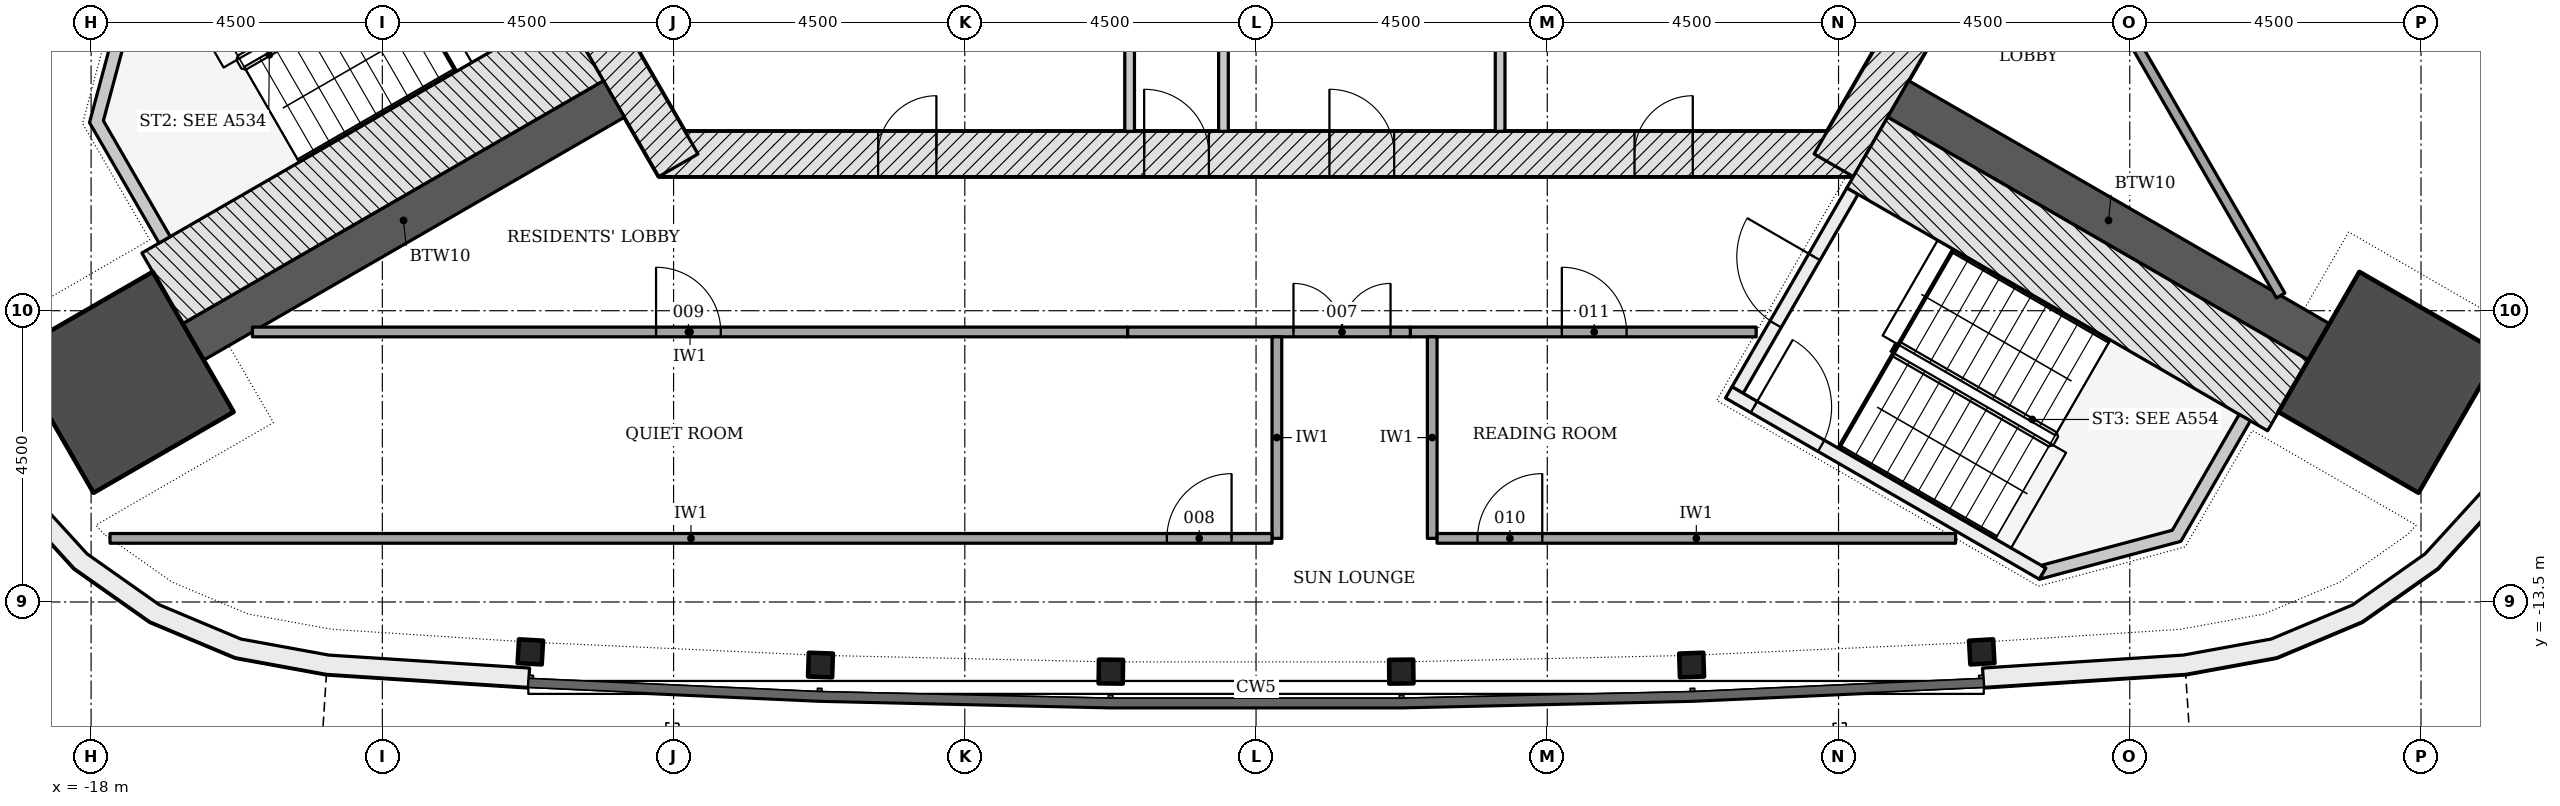
"""IFC4 building model, lengths in metres.
Left out: names, types, materials, properties, quantities, classifications, styles, units other than length and angle.
Written with IfcOpenShell. Run it as: python <this file> out.ifc"""

import sys

from ifc_helpers import new_model, si_unit, direction, frame, frame_2d, origin, origin_2d, place, context, subcontext, project, spatial, polyline, rectangle, i_section, outline, extrude, element, fill, save


model = new_model("IFC4")
c1 = context("Model", 3, precision=1e-05, world=origin(), true_north=direction((0.0, 1.0)))
c2 = subcontext(c1, "Body", "Model", "MODEL_VIEW")
j1 = project(units=[si_unit("LENGTHUNIT", "METRE"), si_unit("PLANEANGLEUNIT", "RADIAN")], contexts=[c1])
p1 = place(None, origin())
s1 = spatial("IfcSite", under=j1, at=p1, CompositionType="ELEMENT")
p2 = place(p1, origin())
s2 = spatial("IfcBuilding", under=s1, at=p2, CompositionType="ELEMENT")
p3 = place(p2, frame((0.0, 0.0, 232.8)))
s3 = spatial("IfcBuildingStorey", under=s2, at=p3, CompositionType="ELEMENT", Elevation=232.8)
p4 = place(p3, frame((-9.229, -6.578, -0.2), z_axis=(0.0, 0.0, 1.0), x_axis=(1.0, 0.0, 0.0)))
e1 = element("IfcWall", 1, at=p4, inside=s3, PredefinedType="SHEAR", context=c2, shape_type="SweptSolid", body=[
    extrude(rectangle(XDim=18.458, YDim=0.7, at=frame_2d((9.229, 0.0))), origin(), (0.0, 0.0, 1.0), 3.6),
])
p5 = place(p4, frame((7.5, 0.0, 0.2)))
e2 = element("IfcOpeningElement", 2, at=p5, cuts=e1, PredefinedType="OPENING", context=c2, shape_type="SweptSolid", body=[
    extrude(rectangle(XDim=1.0, YDim=2.1, at=frame_2d((0.5, 1.05))), frame((0.0, 0.36, 0.0), z_axis=(0.0, -1.0, 0.0), x_axis=(1.0, 0.0, 0.0)), (0.0, 0.0, 1.0), 0.72),
])
p6 = place(p4, frame((3.389, 0.0, 0.2)))
e3 = element("IfcOpeningElement", 3, at=p6, cuts=e1, PredefinedType="OPENING", context=c2, shape_type="SweptSolid", body=[
    extrude(rectangle(XDim=0.9, YDim=2.1, at=frame_2d((0.45, 1.05))), frame((0.0, 0.36, 0.0), z_axis=(0.0, -1.0, 0.0), x_axis=(1.0, 0.0, 0.0)), (0.0, 0.0, 1.0), 0.72),
])
p7 = place(p4, frame((10.363, 0.0, 0.2)))
e4 = element("IfcOpeningElement", 4, at=p7, cuts=e1, PredefinedType="OPENING", context=c2, shape_type="SweptSolid", body=[
    extrude(rectangle(XDim=1.0, YDim=2.1, at=frame_2d((0.5, 1.05))), frame((0.0, 0.36, 0.0), z_axis=(0.0, -1.0, 0.0), x_axis=(1.0, 0.0, 0.0)), (0.0, 0.0, 1.0), 0.72),
])
p8 = place(p4, frame((15.077, 0.0, 0.2)))
e5 = element("IfcOpeningElement", 5, at=p8, cuts=e1, PredefinedType="OPENING", context=c2, shape_type="SweptSolid", body=[
    extrude(rectangle(XDim=0.9, YDim=2.1, at=frame_2d((0.45, 1.05))), frame((0.0, 0.36, 0.0), z_axis=(0.0, -1.0, 0.0), x_axis=(1.0, 0.0, 0.0)), (0.0, 0.0, 1.0), 0.72),
])
for number, where, z_axis, x_axis in (
    (6, (8.926, -6.753, -0.2), (0.0, 0.0, 1.0), (0.5, 0.866, 0.0)),
    (7, (-10.311, -4.353, -0.2), (0.0, 0.0, 1.0), (0.5, -0.866, 0.0)),
):
    element("IfcWall", number, at=place(p3, frame(where, z_axis=z_axis, x_axis=x_axis)), inside=s3, PredefinedType="SHEAR", context=c2, shape_type="SweptSolid", body=[
        extrude(rectangle(XDim=2.771, YDim=0.7, at=frame_2d((1.386, 0.0))), origin(), (0.0, 0.0, 1.0), 3.6),
    ])
for number, where, z_axis, x_axis in (
    (8, (-9.922, -5.728, -0.2), (0.0, 0.0, 1.0), (-0.866, -0.5, 0.0)),
    (9, (9.922, -5.728, -0.2), (0.0, 0.0, 1.0), (0.866, -0.5, 0.0)),
):
    element("IfcWall", number, at=place(p3, frame(where, z_axis=z_axis, x_axis=x_axis)), inside=s3, PredefinedType="SHEAR", context=c2, shape_type="SweptSolid", body=[
        extrude(rectangle(XDim=7.506, YDim=0.65, at=frame_2d((3.753, 0.0))), origin(), (0.0, 0.0, 1.0), 3.6),
    ])
for number, where, z_axis, x_axis in (
    (10, (-17.505, -10.106, -0.2), (0.0, 0.0, 1.0), (-0.866, -0.5, 0.0)),
    (11, (17.505, -10.106, -0.2), (0.0, 0.0, 1.0), (0.866, -0.5, 0.0)),
):
    element("IfcColumn", number, at=place(p3, frame(where, z_axis=z_axis, x_axis=x_axis)), inside=s3, PredefinedType="COLUMN", context=c2, shape_type="SweptSolid", body=[
        extrude(rectangle(XDim=2.5, YDim=2.5, at=origin_2d()), origin(), (0.0, 0.0, 1.0), 3.6),
    ])
for number, where, z_axis, x_axis in (
    (12, (-11.213, -14.271, -0.2), (0.0, 0.0, 1.0), (0.998, -0.057, 0.0)),
    (13, (-6.73, -14.474, -0.2), (0.0, 0.0, 1.0), (0.999, -0.034, 0.0)),
    (14, (-2.244, -14.576, -0.2), (0.0, 0.0, 1.0), (1.0, -0.011, 0.0)),
    (15, (2.244, -14.576, -0.2), (0.0, 0.0, 1.0), (1.0, 0.011, 0.0)),
    (16, (6.73, -14.474, -0.2), (0.0, 0.0, 1.0), (0.999, 0.034, 0.0)),
    (17, (11.213, -14.271, -0.2), (0.0, 0.0, 1.0), (0.998, 0.057, 0.0)),
):
    element("IfcColumn", number, at=place(p3, frame(where, z_axis=z_axis, x_axis=x_axis)), inside=s3, PredefinedType="COLUMN", context=c2, shape_type="SweptSolid", body=[
        extrude(i_section(OverallWidth=0.373, OverallDepth=0.368, WebThickness=0.015, FlangeThickness=0.024, FilletRadius=0.015, at=origin_2d()), origin(), (0.0, 0.0, 1.0), 3.6),
    ])
p9 = place(p3, origin())
e18 = element("IfcWall", 18, at=p9, inside=s3, PredefinedType="NOTDEFINED", context=c2, shape_type="SweptSolid", body=[
    extrude(outline(polyline([(-18.457, -2.328), (-19.842, -5.13), (-20.323, -6.478), (-20.504, -7.898), (-20.375, -9.323), (-19.942, -10.687), (-19.227, -11.927), (-18.261, -12.983), (-17.092, -13.808), (-15.772, -14.361), (-14.364, -14.619), (-11.244, -14.82), (-11.225, -14.521), (-14.327, -14.32), (-15.686, -14.072), (-16.945, -13.544), (-18.062, -12.757), (-18.983, -11.748), (-19.666, -10.566), (-20.079, -9.264), (-20.202, -7.903), (-20.03, -6.548), (-19.565, -5.248), (-18.188, -2.46), (-18.457, -2.328)])), origin(), (0.0, 0.0, 1.0), 3.3),
])
p10 = place(p3, origin())
e19 = element("IfcWall", 19, at=p10, inside=s3, PredefinedType="NOTDEFINED", context=c2, shape_type="SweptSolid", body=[
    extrude(outline(polyline([(11.244, -14.82), (14.364, -14.619), (15.772, -14.361), (17.092, -13.808), (18.261, -12.983), (19.227, -11.927), (19.942, -10.687), (20.375, -9.323), (20.504, -7.898), (20.323, -6.478), (19.842, -5.13), (18.457, -2.328), (18.188, -2.46), (19.565, -5.248), (20.03, -6.548), (20.202, -7.903), (20.079, -9.264), (19.666, -10.566), (18.983, -11.748), (18.062, -12.757), (16.945, -13.544), (15.686, -14.072), (14.327, -14.32), (11.225, -14.521), (11.244, -14.82)])), origin(), (0.0, 0.0, 1.0), 3.3),
])
p11 = place(p3, frame((-1.954, 8.942, 0.0), z_axis=(0.0, 0.0, 1.0), x_axis=(0.0, -1.0, 0.0)))
e20 = element("IfcWall", 20, at=p11, inside=s3, PredefinedType="PARTITIONING", context=c2, shape_type="SweptSolid", body=[
    extrude(rectangle(XDim=15.171, YDim=0.15, at=frame_2d((7.585, 0.0))), origin(), (0.0, 0.0, 1.0), 3.4),
])
p12 = place(p11, frame((7.121, 0.0, 0.0)))
e21 = element("IfcOpeningElement", 21, at=p12, cuts=e20, PredefinedType="OPENING", context=c2, shape_type="SweptSolid", body=[
    extrude(rectangle(XDim=0.9, YDim=2.1, at=frame_2d((0.45, 1.05))), frame((0.0, 0.085, 0.0), z_axis=(0.0, -1.0, 0.0), x_axis=(1.0, 0.0, 0.0)), (0.0, 0.0, 1.0), 0.17),
])
p13 = place(p3, frame((-0.504, 5.897, 0.0), z_axis=(0.0, 0.0, 1.0), x_axis=(0.0, -1.0, 0.0)))
e22 = element("IfcWall", 22, at=p13, inside=s3, PredefinedType="PARTITIONING", context=c2, shape_type="SweptSolid", body=[
    extrude(rectangle(XDim=12.125, YDim=0.15, at=frame_2d((6.062, 0.0))), origin(), (0.0, 0.0, 1.0), 3.4),
])
p14 = place(p13, frame((4.114, 0.0, 0.0)))
e23 = element("IfcOpeningElement", 23, at=p14, cuts=e22, PredefinedType="OPENING", context=c2, shape_type="SweptSolid", body=[
    extrude(rectangle(XDim=0.9, YDim=2.1, at=frame_2d((0.45, 1.05))), frame((0.0, 0.085, 0.0), z_axis=(0.0, -1.0, 0.0), x_axis=(1.0, 0.0, 0.0)), (0.0, 0.0, 1.0), 0.17),
])
p15 = place(p3, frame((3.771, -3.303, 0.0), z_axis=(0.0, 0.0, 1.0), x_axis=(0.0, -1.0, 0.0)))
e24 = element("IfcWall", 24, at=p15, inside=s3, PredefinedType="PARTITIONING", context=c2, shape_type="SweptSolid", body=[
    extrude(rectangle(XDim=2.925, YDim=0.15, at=frame_2d((1.462, 0.0))), origin(), (0.0, 0.0, 1.0), 3.4),
])
p16 = place(p3, frame((-10.399, -4.901, -0.2), z_axis=(0.0, 0.0, 1.0), x_axis=(-0.866020939036, -0.500007733091, 0.0)))
e25 = element("IfcWall", 25, at=p16, inside=s3, PredefinedType="SHEAR", context=c2, shape_type="SweptSolid", body=[
    extrude(rectangle(XDim=7.507, YDim=1.261, at=frame_2d((3.753, 0.0))), origin(), (0.0, 0.0, 1.0), 3.6),
])
p17 = place(p3, frame((0.0, 0.0, -0.2)))
e26 = element("IfcWall", 26, at=p17, inside=s3, PredefinedType="SHEAR", context=c2, shape_type="SweptSolid", body=[
    extrude(outline(polyline([(-17.439, -3.907), (-18.025, -6.093), (-16.95, -7.955), (-16.777, -7.855), (-17.81, -6.065), (-17.267, -4.039), (-17.339, -4.081), (-17.339, -4.081), (-17.339, -4.081), (-17.339, -4.081), (-17.339, -4.081), (-17.339, -4.081), (-17.339, -4.081), (-17.339, -4.081), (-17.339, -4.081), (-17.339, -4.081), (-17.339, -4.081), (-17.339, -4.081), (-17.339, -4.081), (-17.339, -4.081), (-17.339, -4.081), (-17.339, -4.081), (-17.339, -4.081), (-17.439, -3.907)])), origin(), (0.0, 0.0, 1.0), 3.6),
])
p18 = place(p3, frame((7.44, -10.226, -0.2), z_axis=(0.0, 0.0, 1.0), x_axis=(0.500022077904, 0.866012656725, 0.0)))
e27 = element("IfcWall", 27, at=p18, inside=s3, PredefinedType="SHEAR", context=c2, shape_type="SweptSolid", body=[
    extrude(rectangle(XDim=3.55, YDim=0.2, at=frame_2d((1.775, 0.0))), origin(), (0.0, 0.0, 1.0), 3.6),
])
p19 = place(p18, frame((1.175, 0.0, 0.2)))
e28 = element("IfcOpeningElement", 28, at=p19, cuts=e27, PredefinedType="OPENING", context=c2, shape_type="SweptSolid", body=[
    extrude(rectangle(XDim=1.2, YDim=2.1, at=frame_2d((0.6, 1.05))), frame((0.0, 0.11, 0.0), z_axis=(0.0, -1.0, 0.0), x_axis=(1.0, 0.0, 0.0)), (0.0, 0.0, 1.0), 0.22),
])
p20 = place(p3, frame((7.304, -10.262, -0.2), z_axis=(0.0, 0.0, 1.0), x_axis=(0.866026594901, -0.49999793692, 0.0)))
e29 = element("IfcWall", 29, at=p20, inside=s3, PredefinedType="SHEAR", context=c2, shape_type="SweptSolid", body=[
    extrude(rectangle(XDim=5.6, YDim=0.2, at=frame_2d((2.8, 0.0))), origin(), (0.0, 0.0, 1.0), 3.6),
])
p21 = place(p20, frame((0.45, 0.0, 0.2)))
e30 = element("IfcOpeningElement", 30, at=p21, cuts=e29, PredefinedType="OPENING", context=c2, shape_type="SweptSolid", body=[
    extrude(rectangle(XDim=1.2, YDim=2.1, at=frame_2d((0.6, 1.05))), frame((0.0, 0.11, 0.0), z_axis=(0.0, -1.0, 0.0), x_axis=(1.0, 0.0, 0.0)), (0.0, 0.0, 1.0), 0.22),
])
p22 = place(p3, frame((9.444, -6.555, -0.2), z_axis=(0.0, 0.0, 1.0), x_axis=(0.866020939036, -0.500007733091, 0.0)))
e31 = element("IfcWall", 31, at=p22, inside=s3, PredefinedType="SHEAR", context=c2, shape_type="SweptSolid", body=[
    extrude(rectangle(XDim=7.507, YDim=1.261, at=frame_2d((3.753, 0.0))), origin(), (0.0, 0.0, 1.0), 3.6),
])
p23 = place(p3, frame((0.0, 0.0, -0.2)))
e32 = element("IfcWall", 32, at=p23, inside=s3, PredefinedType="SHEAR", context=c2, shape_type="SweptSolid", body=[
    extrude(outline(polyline([(12.104, -13.149), (14.289, -12.563), (15.364, -10.701), (15.191, -10.601), (14.157, -12.392), (12.132, -12.934), (12.204, -12.976), (12.204, -12.976), (12.204, -12.976), (12.204, -12.976), (12.204, -12.976), (12.204, -12.976), (12.204, -12.976), (12.204, -12.976), (12.204, -12.976), (12.204, -12.976), (12.204, -12.976), (12.204, -12.976), (12.204, -12.976), (12.204, -12.976), (12.204, -12.976), (12.204, -12.976), (12.204, -12.976), (12.104, -13.149)])), origin(), (0.0, 0.0, 1.0), 3.6),
])
p24 = place(p3, frame((15.832, -8.765, 0.0), z_axis=(0.0, 0.0, 1.0), x_axis=(-0.500008967739, 0.866020226196, 0.0)))
e33 = element("IfcWall", 33, at=p24, inside=s3, PredefinedType="PARTITIONING", context=c2, shape_type="SweptSolid", body=[
    extrude(rectangle(XDim=13.523, YDim=0.15, at=frame_2d((6.761, 0.0))), origin(), (0.0, 0.0, 1.0), 2.852),
])
p25 = place(p3, frame((-15.507, -9.328, 0.0), z_axis=(0.0, 0.0, 1.0), x_axis=(1.0, 0.0, 0.0)))
e34 = element("IfcWall", 34, at=p25, inside=s3, PredefinedType="PARTITIONING", context=c2, shape_type="SweptSolid", body=[
    extrude(rectangle(XDim=13.522, YDim=0.15, at=frame_2d((6.761, 0.0))), origin(), (0.0, 0.0, 1.0), 2.852),
])
p26 = place(p25, frame((6.236, 0.0, 0.0)))
e35 = element("IfcOpeningElement", 35, at=p26, cuts=e34, PredefinedType="OPENING", context=c2, shape_type="SweptSolid", body=[
    extrude(rectangle(XDim=1.0, YDim=2.1, at=frame_2d((0.5, 1.05))), frame((0.0, 0.085, 0.0), z_axis=(0.0, -1.0, 0.0), x_axis=(1.0, 0.0, 0.0)), (0.0, 0.0, 1.0), 0.17),
])
p27 = place(p3, frame((2.384, -9.328, 0.0), z_axis=(0.0, 0.0, 1.0), x_axis=(1.0, 0.0, 0.0)))
e36 = element("IfcWall", 36, at=p27, inside=s3, PredefinedType="PARTITIONING", context=c2, shape_type="SweptSolid", body=[
    extrude(rectangle(XDim=5.343, YDim=0.15, at=frame_2d((2.672, 0.0))), origin(), (0.0, 0.0, 1.0), 2.852),
])
p28 = place(p27, frame((2.341, 0.0, 0.0)))
e37 = element("IfcOpeningElement", 37, at=p28, cuts=e36, PredefinedType="OPENING", context=c2, shape_type="SweptSolid", body=[
    extrude(rectangle(XDim=1.0, YDim=2.1, at=frame_2d((0.5, 1.05))), frame((0.0, 0.085, 0.0), z_axis=(0.0, -1.0, 0.0), x_axis=(1.0, 0.0, 0.0)), (0.0, 0.0, 1.0), 0.17),
])
p29 = place(p3, frame((-1.984, -9.328, 0.0), z_axis=(0.0, 0.0, 1.0), x_axis=(1.0, 0.0, 0.0)))
e38 = element("IfcWall", 38, at=p29, inside=s3, PredefinedType="PARTITIONING", context=c2, shape_type="SweptSolid", body=[
    extrude(rectangle(XDim=4.369, YDim=0.15, at=frame_2d((2.184, 0.0))), origin(), (0.0, 0.0, 1.0), 2.852),
])
p30 = place(p29, frame((2.562, 0.0, 0.0)))
e39 = element("IfcOpeningElement", 39, at=p30, cuts=e38, PredefinedType="OPENING", context=c2, shape_type="SweptSolid", body=[
    extrude(rectangle(XDim=1.5, YDim=2.1, at=frame_2d((0.75, 1.05))), frame((0.0, 0.085, 0.0), z_axis=(0.0, -1.0, 0.0), x_axis=(1.0, 0.0, 0.0)), (0.0, 0.0, 1.0), 0.17),
])
for number, where, z_axis, x_axis in (
    (40, (0.322, -9.403, 0.0), (0.0, 0.0, 1.0), (0.0, -1.0, 0.0)),
    (41, (2.722, -9.403, 0.0), (0.0, 0.0, 1.0), (0.0, -1.0, 0.0)),
):
    element("IfcWall", number, at=place(p3, frame(where, z_axis=z_axis, x_axis=x_axis)), inside=s3, PredefinedType="PARTITIONING", context=c2, shape_type="SweptSolid", body=[
        extrude(rectangle(XDim=3.114, YDim=0.15, at=frame_2d((1.557, 0.0))), origin(), (0.0, 0.0, 1.0), 3.4),
    ])
p31 = place(p3, frame((-17.708, -12.517, 0.0), z_axis=(0.0, 0.0, 1.0), x_axis=(1.0, 0.0, 0.0)))
e42 = element("IfcWall", 42, at=p31, inside=s3, PredefinedType="PARTITIONING", context=c2, shape_type="SweptSolid", body=[
    extrude(rectangle(XDim=17.955, YDim=0.15, at=frame_2d((8.978, 0.0))), origin(), (0.0, 0.0, 1.0), 2.852),
])
p32 = place(p31, frame((16.33, 0.0, 0.0)))
e43 = element("IfcOpeningElement", 43, at=p32, cuts=e42, PredefinedType="OPENING", context=c2, shape_type="SweptSolid", body=[
    extrude(rectangle(XDim=1.0, YDim=2.1, at=frame_2d((0.5, 1.05))), frame((0.0, 0.085, 0.0), z_axis=(0.0, -1.0, 0.0), x_axis=(1.0, 0.0, 0.0)), (0.0, 0.0, 1.0), 0.17),
])
p33 = place(p3, frame((2.797, -12.517, 0.0), z_axis=(0.0, 0.0, 1.0), x_axis=(1.0, 0.0, 0.0)))
e44 = element("IfcWall", 44, at=p33, inside=s3, PredefinedType="PARTITIONING", context=c2, shape_type="SweptSolid", body=[
    extrude(rectangle(XDim=8.012, YDim=0.15, at=frame_2d((4.006, 0.0))), origin(), (0.0, 0.0, 1.0), 2.852),
])
p34 = place(p33, frame((0.625, 0.0, 0.0)))
e45 = element("IfcOpeningElement", 45, at=p34, cuts=e44, PredefinedType="OPENING", context=c2, shape_type="SweptSolid", body=[
    extrude(rectangle(XDim=1.0, YDim=2.1, at=frame_2d((0.5, 1.05))), frame((0.0, 0.085, 0.0), z_axis=(0.0, -1.0, 0.0), x_axis=(1.0, 0.0, 0.0)), (0.0, 0.0, 1.0), 0.17),
])
p35 = place(p5, origin())
e46 = element("IfcDoor", 46, at=p35, inside=s3, OperationType="SINGLE_SWING_LEFT", PredefinedType="DOOR", context=c2, shape_type="SweptSolid", body=[
    extrude(rectangle(XDim=1.0, YDim=2.1, at=frame_2d((0.5, 1.05))), frame((0.0, 0.075, 0.0), z_axis=(0.0, -1.0, 0.0), x_axis=(1.0, 0.0, 0.0)), (0.0, 0.0, 1.0), 0.15),
])
fill(e2, e46)
p36 = place(p6, origin())
e47 = element("IfcDoor", 47, at=p36, inside=s3, OperationType="SINGLE_SWING_RIGHT", PredefinedType="DOOR", context=c2, shape_type="SweptSolid", body=[
    extrude(rectangle(XDim=0.9, YDim=2.1, at=frame_2d((0.45, 1.05))), frame((0.0, 0.075, 0.0), z_axis=(0.0, -1.0, 0.0), x_axis=(1.0, 0.0, 0.0)), (0.0, 0.0, 1.0), 0.15),
])
fill(e3, e47)
p37 = place(p7, origin())
e48 = element("IfcDoor", 48, at=p37, inside=s3, OperationType="SINGLE_SWING_LEFT", PredefinedType="DOOR", context=c2, shape_type="SweptSolid", body=[
    extrude(rectangle(XDim=1.0, YDim=2.1, at=frame_2d((0.5, 1.05))), frame((0.0, 0.075, 0.0), z_axis=(0.0, -1.0, 0.0), x_axis=(1.0, 0.0, 0.0)), (0.0, 0.0, 1.0), 0.15),
])
fill(e4, e48)
p38 = place(p8, origin())
e49 = element("IfcDoor", 49, at=p38, inside=s3, OperationType="SINGLE_SWING_RIGHT", PredefinedType="DOOR", context=c2, shape_type="SweptSolid", body=[
    extrude(rectangle(XDim=0.9, YDim=2.1, at=frame_2d((0.45, 1.05))), frame((0.0, 0.075, 0.0), z_axis=(0.0, -1.0, 0.0), x_axis=(1.0, 0.0, 0.0)), (0.0, 0.0, 1.0), 0.15),
])
fill(e5, e49)
p39 = place(p19, origin())
e50 = element("IfcDoor", 50, at=p39, inside=s3, OperationType="SINGLE_SWING_RIGHT", PredefinedType="DOOR", context=c2, shape_type="SweptSolid", body=[
    extrude(rectangle(XDim=1.2, YDim=2.1, at=frame_2d((0.6, 1.05))), frame((0.0, 0.025, 0.0), z_axis=(0.0, -1.0, 0.0), x_axis=(1.0, 0.0, 0.0)), (0.0, 0.0, 1.0), 0.05),
])
fill(e28, e50)
p40 = place(p21, origin())
e51 = element("IfcDoor", 51, at=p40, inside=s3, OperationType="SINGLE_SWING_LEFT", PredefinedType="DOOR", context=c2, shape_type="SweptSolid", body=[
    extrude(rectangle(XDim=1.2, YDim=2.1, at=frame_2d((0.6, 1.05))), frame((0.0, 0.025, 0.0), z_axis=(0.0, -1.0, 0.0), x_axis=(1.0, 0.0, 0.0)), (0.0, 0.0, 1.0), 0.05),
])
fill(e30, e51)
p41 = place(p30, origin())
e52 = element("IfcDoor", 52, at=p41, inside=s3, OperationType="DOUBLE_DOOR_SINGLE_SWING", PredefinedType="DOOR", context=c2, shape_type="SweptSolid", body=[
    extrude(rectangle(XDim=1.5, YDim=2.1, at=frame_2d((0.75, 1.05))), frame((0.0, 0.025, 0.0), z_axis=(0.0, -1.0, 0.0), x_axis=(1.0, 0.0, 0.0)), (0.0, 0.0, 1.0), 0.05),
])
fill(e39, e52)
p42 = place(p32, origin())
e53 = element("IfcDoor", 53, at=p42, inside=s3, OperationType="SINGLE_SWING_RIGHT", PredefinedType="DOOR", context=c2, shape_type="SweptSolid", body=[
    extrude(rectangle(XDim=1.0, YDim=2.1, at=frame_2d((0.5, 1.05))), frame((0.0, 0.025, 0.0), z_axis=(0.0, -1.0, 0.0), x_axis=(1.0, 0.0, 0.0)), (0.0, 0.0, 1.0), 0.05),
])
fill(e43, e53)
p43 = place(p26, origin())
e54 = element("IfcDoor", 54, at=p43, inside=s3, OperationType="SINGLE_SWING_LEFT", PredefinedType="DOOR", context=c2, shape_type="SweptSolid", body=[
    extrude(rectangle(XDim=1.0, YDim=2.1, at=frame_2d((0.5, 1.05))), frame((0.0, 0.025, 0.0), z_axis=(0.0, -1.0, 0.0), x_axis=(1.0, 0.0, 0.0)), (0.0, 0.0, 1.0), 0.05),
])
fill(e35, e54)
p44 = place(p34, origin())
e55 = element("IfcDoor", 55, at=p44, inside=s3, OperationType="SINGLE_SWING_RIGHT", PredefinedType="DOOR", context=c2, shape_type="SweptSolid", body=[
    extrude(rectangle(XDim=1.0, YDim=2.1, at=frame_2d((0.5, 1.05))), frame((0.0, 0.025, 0.0), z_axis=(0.0, -1.0, 0.0), x_axis=(1.0, 0.0, 0.0)), (0.0, 0.0, 1.0), 0.05),
])
fill(e45, e55)
p45 = place(p28, origin())
e56 = element("IfcDoor", 56, at=p45, inside=s3, OperationType="SINGLE_SWING_LEFT", PredefinedType="DOOR", context=c2, shape_type="SweptSolid", body=[
    extrude(rectangle(XDim=1.0, YDim=2.1, at=frame_2d((0.5, 1.05))), frame((0.0, 0.025, 0.0), z_axis=(0.0, -1.0, 0.0), x_axis=(1.0, 0.0, 0.0)), (0.0, 0.0, 1.0), 0.05),
])
fill(e37, e56)
save(model, sys.argv[1])
